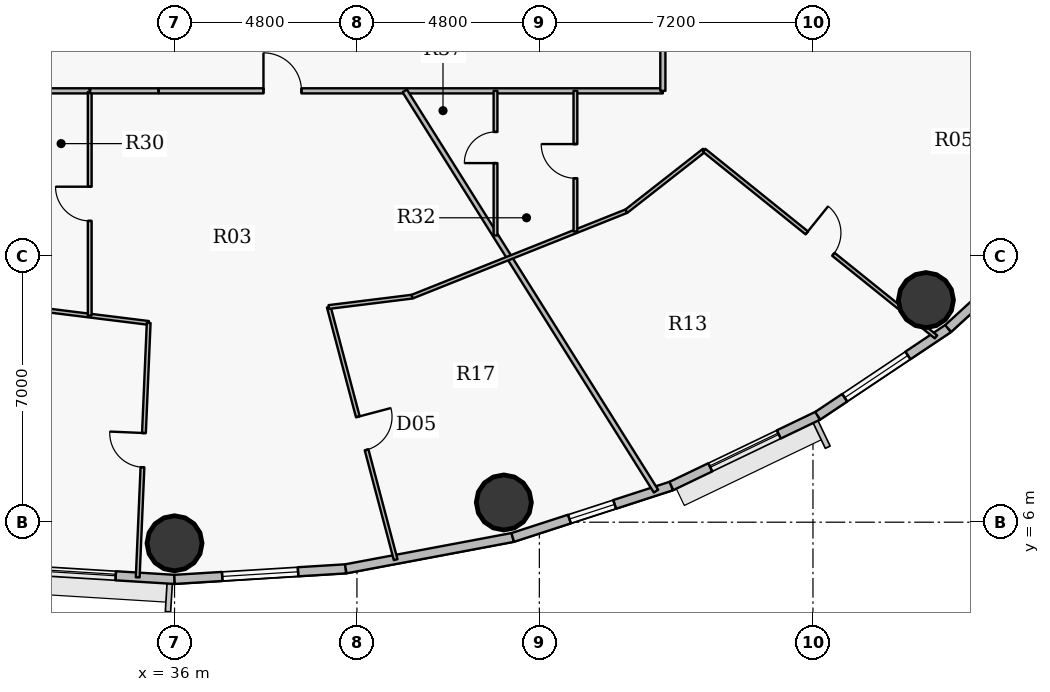
"""IFC4 building model, lengths in metres.
Left out: names, types, materials, properties, quantities, classifications, styles, units other than length and angle.
Written with IfcOpenShell. Run it as: python <this file> out.ifc"""

import sys

from ifc_helpers import new_model, si_unit, direction, frame, frame_2d, origin, origin_2d, place, context, subcontext, project, spatial, rectangle, hollow_circle, extrude, source, transform, mapped, element, fill, save


model = new_model("IFC4")
c1 = context("Model", 3, precision=1e-05, world=origin(), true_north=direction((0.0, 1.0)))
c2 = subcontext(c1, "Body", "Model", "MODEL_VIEW")
j1 = project(units=[si_unit("LENGTHUNIT", "METRE"), si_unit("PLANEANGLEUNIT", "RADIAN")], contexts=[c1])
p1 = place(None, origin())
s1 = spatial("IfcSite", under=j1, at=p1, CompositionType="ELEMENT")
p2 = place(p1, origin())
s2 = spatial("IfcBuilding", under=s1, at=p2, CompositionType="ELEMENT")
p3 = place(p2, frame((0.0, 0.0, 123.45)))
s3 = spatial("IfcBuildingStorey", under=s2, at=p3, CompositionType="ELEMENT", Elevation=123.45)
for number, where, z_axis, x_axis in (
    (1, (36.0, 5.445, 0.0), (0.0, 0.0, 1.0), (1.0, 0.0, 0.0)),
    (2, (44.666, 6.519, 0.0), (0.0, 0.0, 1.0), (1.0, 0.0, 0.0)),
    (3, (55.773, 11.844, 0.0), (0.0, 0.0, 1.0), (1.0, 0.0, 0.0)),
):
    element("IfcColumn", number, at=place(p3, frame(where, z_axis=z_axis, x_axis=x_axis)), inside=s3, PredefinedType="COLUMN", context=c2, shape_type="SweptSolid", body=[
        extrude(hollow_circle(Radius=0.725, WallThickness=0.042, at=origin_2d()), origin(), (0.0, 0.0, 1.0), 3.75),
    ])
p4 = place(p3, frame((36.0, 4.495, 0.0), z_axis=(0.0, 0.0, 1.0), x_axis=(-0.998107531589, 0.061492726276, 0.0)))
e4 = element("IfcWall", 4, at=p4, inside=s3, PredefinedType="SOLIDWALL", context=c2, shape_type="SweptSolid", body=[
    extrude(rectangle(XDim=4.514, YDim=0.24, at=frame_2d((2.257, 0.0))), origin(), (0.0, 0.0, 1.0), 3.5),
])
p5 = place(p4, frame((1.55, 0.0, 0.9)))
e5 = element("IfcOpeningElement", 5, at=p5, cuts=e4, PredefinedType="OPENING", context=c2, shape_type="SweptSolid", body=[
    extrude(rectangle(XDim=2.0, YDim=1.75, at=origin_2d()), frame((1.0, 0.13, 0.875), z_axis=(0.0, -1.0, 0.0), x_axis=(1.0, 0.0, 0.0)), (0.0, 0.0, 1.0), 0.26),
])
p6 = place(p3, frame((40.506, 4.773, 0.0), z_axis=(0.0, 0.0, 1.0), x_axis=(-0.998107531589, -0.061492726276, 0.0)))
e6 = element("IfcWall", 6, at=p6, inside=s3, PredefinedType="SOLIDWALL", context=c2, shape_type="SweptSolid", body=[
    extrude(rectangle(XDim=4.514, YDim=0.24, at=frame_2d((2.257, 0.0))), origin(), (0.0, 0.0, 1.0), 3.5),
])
p7 = place(p6, frame((1.257, 0.0, 0.9)))
e7 = element("IfcOpeningElement", 7, at=p7, cuts=e6, PredefinedType="OPENING", context=c2, shape_type="SweptSolid", body=[
    extrude(rectangle(XDim=2.0, YDim=1.75, at=origin_2d()), frame((1.0, 0.13, 0.875), z_axis=(0.0, -1.0, 0.0), x_axis=(1.0, 0.0, 0.0)), (0.0, 0.0, 1.0), 0.26),
])
p8 = place(p3, frame((44.9, 5.599, 0.0), z_axis=(0.0, 0.0, 1.0), x_axis=(-0.982789252177, -0.184730305596, 0.0)))
e8 = element("IfcWall", 8, at=p8, inside=s3, PredefinedType="SOLIDWALL", context=c2, shape_type="SweptSolid", body=[
    extrude(rectangle(XDim=4.471, YDim=0.24, at=frame_2d((2.235, 0.0))), origin(), (0.0, 0.0, 1.0), 3.5),
])
p9 = place(p3, frame((49.074, 6.953, 0.0), z_axis=(0.0, 0.0, 1.0), x_axis=(-0.951211346073, -0.308540070495, 0.0)))
e9 = element("IfcWall", 9, at=p9, inside=s3, PredefinedType="SOLIDWALL", context=c2, shape_type="SweptSolid", body=[
    extrude(rectangle(XDim=4.388, YDim=0.24, at=frame_2d((2.194, 0.0))), origin(), (0.0, 0.0, 1.0), 3.5),
])
p10 = place(p9, frame((1.569, 0.0, 0.9)))
e10 = element("IfcOpeningElement", 10, at=p10, cuts=e9, PredefinedType="OPENING", context=c2, shape_type="SweptSolid", body=[
    extrude(rectangle(XDim=1.25, YDim=1.65, at=origin_2d()), frame((0.625, 0.13, 0.825), z_axis=(0.0, -1.0, 0.0), x_axis=(1.0, 0.0, 0.0)), (0.0, 0.0, 1.0), 0.26),
])
p11 = place(p3, frame((52.925, 8.801, 0.0), z_axis=(0.0, 0.0, 1.0), x_axis=(-0.901589935876, -0.432591709962, 0.0)))
e11 = element("IfcWall", 11, at=p11, inside=s3, PredefinedType="SOLIDWALL", context=c2, shape_type="SweptSolid", body=[
    extrude(rectangle(XDim=4.272, YDim=0.24, at=frame_2d((2.136, 0.0))), origin(), (0.0, 0.0, 1.0), 3.5),
])
p12 = place(p11, frame((1.136, 0.0, 0.9)))
e12 = element("IfcOpeningElement", 12, at=p12, cuts=e11, PredefinedType="OPENING", context=c2, shape_type="SweptSolid", body=[
    extrude(rectangle(XDim=2.0, YDim=1.75, at=origin_2d()), frame((1.0, 0.13, 0.875), z_axis=(0.0, -1.0, 0.0), x_axis=(1.0, 0.0, 0.0)), (0.0, 0.0, 1.0), 0.26),
])
p13 = place(p3, frame((56.358, 11.097, 0.0), z_axis=(0.0, 0.0, 1.0), x_axis=(-0.831221811447, -0.555940914284, 0.0)))
e13 = element("IfcWall", 13, at=p13, inside=s3, PredefinedType="SOLIDWALL", context=c2, shape_type="SweptSolid", body=[
    extrude(rectangle(XDim=4.13, YDim=0.24, at=frame_2d((2.065, 0.0))), origin(), (0.0, 0.0, 1.0), 3.5),
])
p14 = place(p13, frame((1.276, 0.0, 0.9)))
e14 = element("IfcOpeningElement", 14, at=p14, cuts=e13, PredefinedType="OPENING", context=c2, shape_type="SweptSolid", body=[
    extrude(rectangle(XDim=2.0, YDim=1.75, at=origin_2d()), frame((1.0, 0.13, 0.875), z_axis=(0.0, -1.0, 0.0), x_axis=(1.0, 0.0, 0.0)), (0.0, 0.0, 1.0), 0.26),
])
p15 = place(p3, frame((59.289, 13.783, 0.0), z_axis=(0.0, 0.0, 1.0), x_axis=(-0.737113356241, -0.675769117414, 0.0)))
e15 = element("IfcWall", 15, at=p15, inside=s3, PredefinedType="SOLIDWALL", context=c2, shape_type="SweptSolid", body=[
    extrude(rectangle(XDim=3.976, YDim=0.24, at=frame_2d((1.988, 0.0))), origin(), (0.0, 0.0, 1.0), 3.5),
])
p16 = place(p15, frame((1.363, 0.0, 0.9)))
e16 = element("IfcOpeningElement", 16, at=p16, cuts=e15, PredefinedType="OPENING", context=c2, shape_type="SweptSolid", body=[
    extrude(rectangle(XDim=1.25, YDim=1.65, at=origin_2d()), frame((0.625, 0.13, 0.825), z_axis=(0.0, -1.0, 0.0), x_axis=(1.0, 0.0, 0.0)), (0.0, 0.0, 1.0), 0.26),
])
p17 = place(p3, frame((23.15, 17.35, 0.0), z_axis=(0.0, 0.0, 1.0), x_axis=(1.0, 0.0, 0.0)))
e17 = element("IfcWall", 17, at=p17, inside=s3, PredefinedType="PARTITIONING", context=c2, shape_type="SweptSolid", body=[
    extrude(rectangle(XDim=10.619, YDim=0.135, at=frame_2d((5.31, 0.0))), origin(), (0.0, 0.0, 1.0), 2.935),
])
p18 = place(p17, frame((4.211, 0.0, 0.0)))
e18 = element("IfcOpeningElement", 18, at=p18, cuts=e17, PredefinedType="OPENING", context=c2, shape_type="SweptSolid", body=[
    extrude(rectangle(XDim=1.0, YDim=2.15, at=origin_2d()), frame((0.5, 0.078, 1.075), z_axis=(0.0, -1.0, 0.0), x_axis=(1.0, 0.0, 0.0)), (0.0, 0.0, 1.0), 0.155),
])
p19 = place(p3, frame((30.551, 11.835, 0.0), z_axis=(0.0, 0.0, 1.0), x_axis=(0.992401646286, -0.123040531728, 0.0)))
e19 = element("IfcWall", 19, at=p19, inside=s3, PredefinedType="PARTITIONING", context=c2, shape_type="SweptSolid", body=[
    extrude(rectangle(XDim=4.806, YDim=0.1, at=frame_2d((2.403, 0.0))), origin(), (0.0, 0.0, 1.0), 3.5),
])
p20 = place(p3, frame((33.769, 11.436, 0.0), z_axis=(0.0, 0.0, 1.0), x_axis=(0.0, 1.0, 0.0)))
e20 = element("IfcWall", 20, at=p20, inside=s3, PredefinedType="PARTITIONING", context=c2, shape_type="SweptSolid", body=[
    extrude(rectangle(XDim=5.884, YDim=0.1, at=frame_2d((2.942, 0.0))), origin(), (0.0, 0.0, 1.0), 3.5),
])
p21 = place(p20, frame((2.492, 0.0, 0.0)))
e21 = element("IfcOpeningElement", 21, at=p21, cuts=e20, PredefinedType="OPENING", context=c2, shape_type="SweptSolid", body=[
    extrude(rectangle(XDim=0.9, YDim=2.1, at=origin_2d()), frame((0.45, 0.06, 1.05), z_axis=(0.0, -1.0, 0.0), x_axis=(1.0, 0.0, 0.0)), (0.0, 0.0, 1.0), 0.12),
])
p22 = place(p3, frame((35.031, 4.55, 0.0), z_axis=(0.0, 0.0, 1.0), x_axis=(0.043108301027, 0.999070405118, 0.0)))
e22 = element("IfcWall", 22, at=p22, inside=s3, PredefinedType="PARTITIONING", context=c2, shape_type="SweptSolid", body=[
    extrude(rectangle(XDim=6.7, YDim=0.1, at=frame_2d((3.35, 0.0))), origin(), (0.0, 0.0, 1.0), 2.935),
])
p23 = place(p22, frame((2.9, 0.0, 0.0)))
e23 = element("IfcOpeningElement", 23, at=p23, cuts=e22, PredefinedType="OPENING", context=c2, shape_type="SweptSolid", body=[
    extrude(rectangle(XDim=0.9, YDim=2.1, at=origin_2d()), frame((0.45, 0.06, 1.05), z_axis=(0.0, -1.0, 0.0), x_axis=(1.0, 0.0, 0.0)), (0.0, 0.0, 1.0), 0.12),
])
p24 = place(p3, frame((35.584, 17.35, 0.0), z_axis=(0.0, 0.0, 1.0), x_axis=(1.0, 0.0, 0.0)))
e24 = element("IfcWall", 24, at=p24, inside=s3, PredefinedType="PARTITIONING", context=c2, shape_type="SweptSolid", body=[
    extrude(rectangle(XDim=13.266, YDim=0.135, at=frame_2d((6.633, 0.0))), origin(), (0.0, 0.0, 1.0), 2.935),
])
p25 = place(p24, frame((2.757, 0.0, 0.0)))
e25 = element("IfcOpeningElement", 25, at=p25, cuts=e24, PredefinedType="OPENING", context=c2, shape_type="SweptSolid", body=[
    extrude(rectangle(XDim=1.0, YDim=2.15, at=origin_2d()), frame((0.5, 0.078, 1.075), z_axis=(0.0, -1.0, 0.0), x_axis=(1.0, 0.0, 0.0)), (0.0, 0.0, 1.0), 0.155),
])
p26 = place(p3, frame((40.059, 11.662, 0.0), z_axis=(0.0, 0.0, 1.0), x_axis=(0.255861334688, -0.966713492929, 0.0)))
e26 = element("IfcWall", 26, at=p26, inside=s3, PredefinedType="PARTITIONING", context=c2, shape_type="SweptSolid", body=[
    extrude(rectangle(XDim=6.877, YDim=0.1, at=frame_2d((3.438, 0.0))), origin(), (0.0, 0.0, 1.0), 2.935),
])
p27 = place(p26, frame((2.988, 0.0, 0.0)))
e27 = element("IfcOpeningElement", 27, at=p27, cuts=e26, PredefinedType="OPENING", context=c2, shape_type="SweptSolid", body=[
    extrude(rectangle(XDim=0.9, YDim=2.1, at=origin_2d()), frame((0.45, 0.06, 1.05), z_axis=(0.0, -1.0, 0.0), x_axis=(1.0, 0.0, 0.0)), (0.0, 0.0, 1.0), 0.12),
])
p28 = place(p3, frame((40.059, 11.662, 0.0), z_axis=(0.0, 0.0, 1.0), x_axis=(0.992393057675, 0.12310978466, 0.0)))
e28 = element("IfcWall", 28, at=p28, inside=s3, PredefinedType="PARTITIONING", context=c2, shape_type="SweptSolid", body=[
    extrude(rectangle(XDim=2.209, YDim=0.1, at=frame_2d((1.104, 0.0))), origin(), (0.0, 0.0, 1.0), 2.935),
])
p29 = place(p3, frame((42.058, 17.35, 0.0), z_axis=(0.0, 0.0, 1.0), x_axis=(0.531660079213, -0.846957826678, 0.0)))
e29 = element("IfcWall", 29, at=p29, inside=s3, PredefinedType="PARTITIONING", context=c2, shape_type="SweptSolid", body=[
    extrude(rectangle(XDim=12.437, YDim=0.135, at=frame_2d((6.219, 0.0))), origin(), (0.0, 0.0, 1.0), 2.935),
])
p30 = place(p3, frame((42.251, 11.934, 0.0), z_axis=(0.0, 0.0, 1.0), x_axis=(0.928803554156, 0.370572473055, 0.0)))
e30 = element("IfcWall", 30, at=p30, inside=s3, PredefinedType="PARTITIONING", context=c2, shape_type="SweptSolid", body=[
    extrude(rectangle(XDim=6.072, YDim=0.1, at=frame_2d((3.036, 0.0))), origin(), (0.0, 0.0, 1.0), 2.935),
])
p31 = place(p3, frame((44.447, 13.544, 0.0), z_axis=(0.0, 0.0, 1.0), x_axis=(0.0, 1.0, 0.0)))
e31 = element("IfcWall", 31, at=p31, inside=s3, PredefinedType="PARTITIONING", context=c2, shape_type="SweptSolid", body=[
    extrude(rectangle(XDim=3.806, YDim=0.1, at=frame_2d((1.903, 0.0))), origin(), (0.0, 0.0, 1.0), 3.5),
])
p32 = place(p31, frame((1.905, 0.0, 0.0)))
e32 = element("IfcOpeningElement", 32, at=p32, cuts=e31, PredefinedType="OPENING", context=c2, shape_type="SweptSolid", body=[
    extrude(rectangle(XDim=0.82, YDim=2.1, at=origin_2d()), frame((0.41, 0.06, 1.05), z_axis=(0.0, -1.0, 0.0), x_axis=(1.0, 0.0, 0.0)), (0.0, 0.0, 1.0), 0.12),
])
p33 = place(p3, frame((46.549, 13.649, 0.0), z_axis=(0.0, 0.0, 1.0), x_axis=(0.0, 1.0, 0.0)))
e33 = element("IfcWall", 33, at=p33, inside=s3, PredefinedType="PARTITIONING", context=c2, shape_type="SweptSolid", body=[
    extrude(rectangle(XDim=3.701, YDim=0.1, at=frame_2d((1.851, 0.0))), origin(), (0.0, 0.0, 1.0), 3.5),
])
p34 = place(p33, frame((1.4, 0.0, 0.0)))
e34 = element("IfcOpeningElement", 34, at=p34, cuts=e33, PredefinedType="OPENING", context=c2, shape_type="SweptSolid", body=[
    extrude(rectangle(XDim=0.9, YDim=2.1, at=origin_2d()), frame((0.45, 0.06, 1.05), z_axis=(0.0, -1.0, 0.0), x_axis=(1.0, 0.0, 0.0)), (0.0, 0.0, 1.0), 0.12),
])
p35 = place(p3, frame((47.891, 14.184, 0.0), z_axis=(0.0, 0.0, 1.0), x_axis=(0.787364158956, 0.616488184146, 0.0)))
e35 = element("IfcWall", 35, at=p35, inside=s3, PredefinedType="PARTITIONING", context=c2, shape_type="SweptSolid", body=[
    extrude(rectangle(XDim=2.597, YDim=0.1, at=frame_2d((1.299, 0.0))), origin(), (0.0, 0.0, 1.0), 3.5),
])
p36 = place(p3, frame((48.85, 17.35, 0.0), z_axis=(0.0, 0.0, 1.0), x_axis=(0.0, 1.0, 0.0)))
e36 = element("IfcWall", 36, at=p36, inside=s3, PredefinedType="PARTITIONING", context=c2, shape_type="SweptSolid", body=[
    extrude(rectangle(XDim=19.3, YDim=0.135, at=frame_2d((9.65, 0.0))), origin(), (0.0, 0.0, 1.0), 2.935),
])
p37 = place(p36, frame((2.036, 0.0, 0.0)))
e37 = element("IfcOpeningElement", 37, at=p37, cuts=e36, PredefinedType="OPENING", context=c2, shape_type="SweptSolid", body=[
    extrude(rectangle(XDim=1.0, YDim=2.15, at=origin_2d()), frame((0.5, 0.078, 1.075), z_axis=(0.0, -1.0, 0.0), x_axis=(1.0, 0.0, 0.0)), (0.0, 0.0, 1.0), 0.155),
])
p38 = place(p36, frame((10.875, 0.0, 0.0)))
e38 = element("IfcOpeningElement", 38, at=p38, cuts=e36, PredefinedType="OPENING", context=c2, shape_type="SweptSolid", body=[
    extrude(rectangle(XDim=1.0, YDim=2.15, at=origin_2d()), frame((0.5, 0.078, 1.075), z_axis=(0.0, -1.0, 0.0), x_axis=(1.0, 0.0, 0.0)), (0.0, 0.0, 1.0), 0.155),
])
p39 = place(p3, frame((48.85, 22.383, 0.0), z_axis=(0.0, 0.0, 1.0), x_axis=(0.941089213164, -0.338158384292, 0.0)))
e39 = element("IfcWall", 39, at=p39, inside=s3, PredefinedType="PARTITIONING", context=c2, shape_type="SweptSolid", body=[
    extrude(rectangle(XDim=14.069, YDim=0.135, at=frame_2d((7.035, 0.0))), origin(), (0.0, 0.0, 1.0), 2.935),
])
p40 = place(p3, frame((49.936, 15.786, 0.0), z_axis=(0.0, 0.0, 1.0), x_axis=(0.779083359145, -0.626920345421, 0.0)))
e40 = element("IfcWall", 40, at=p40, inside=s3, PredefinedType="PARTITIONING", context=c2, shape_type="SweptSolid", body=[
    extrude(rectangle(XDim=7.831, YDim=0.1, at=frame_2d((3.916, 0.0))), origin(), (0.0, 0.0, 1.0), 2.935),
])
p41 = place(p40, frame((3.466, 0.0, 0.0)))
e41 = element("IfcOpeningElement", 41, at=p41, cuts=e40, PredefinedType="OPENING", context=c2, shape_type="SweptSolid", body=[
    extrude(rectangle(XDim=0.9, YDim=2.1, at=origin_2d()), frame((0.45, 0.06, 1.05), z_axis=(0.0, -1.0, 0.0), x_axis=(1.0, 0.0, 0.0)), (0.0, 0.0, 1.0), 0.12),
])
p42 = place(p3, frame((35.574, 17.35, 0.0), z_axis=(0.0, 0.0, 1.0), x_axis=(-1.0, 0.0, 0.0)))
e42 = element("IfcWall", 42, at=p42, inside=s3, PredefinedType="PARTITIONING", context=c2, shape_type="SweptSolid", body=[
    extrude(rectangle(XDim=1.795, YDim=0.135, at=frame_2d((0.897, 0.0))), origin(), (0.0, 0.0, 1.0), 3.5),
])
m1 = source(origin(), c2, "Body", "SweptSolid", [
    extrude(rectangle(XDim=2.0, YDim=1.75, at=origin_2d()), frame((1.0, 0.03, 0.875), z_axis=(0.0, -1.0, 0.0), x_axis=(1.0, 0.0, 0.0)), (0.0, 0.0, 1.0), 0.06),
])
p43 = place(p5, origin())
e43 = element("IfcWindow", 43, at=p43, inside=s3, PartitioningType="DOUBLE_PANEL_VERTICAL", PredefinedType="WINDOW", context=c2, shape_type="MappedRepresentation", body=[
    mapped(m1, transform((0.0, 0.0, 0.0), x_axis=(1.0, 0.0, 0.0), y_axis=(0.0, 1.0, 0.0), z_axis=(0.0, 0.0, 1.0), scale=1.0)),
])
fill(e5, e43)
p44 = place(p7, origin())
e44 = element("IfcWindow", 44, at=p44, inside=s3, PartitioningType="DOUBLE_PANEL_VERTICAL", PredefinedType="WINDOW", context=c2, shape_type="MappedRepresentation", body=[
    mapped(m1, transform((0.0, 0.0, 0.0), x_axis=(1.0, 0.0, 0.0), y_axis=(0.0, 1.0, 0.0), z_axis=(0.0, 0.0, 1.0), scale=1.0)),
])
fill(e7, e44)
p45 = place(p12, origin())
e45 = element("IfcWindow", 45, at=p45, inside=s3, PartitioningType="DOUBLE_PANEL_VERTICAL", PredefinedType="WINDOW", context=c2, shape_type="MappedRepresentation", body=[
    mapped(m1, transform((0.0, 0.0, 0.0), x_axis=(1.0, 0.0, 0.0), y_axis=(0.0, 1.0, 0.0), z_axis=(0.0, 0.0, 1.0), scale=1.0)),
])
fill(e12, e45)
p46 = place(p14, origin())
e46 = element("IfcWindow", 46, at=p46, inside=s3, PartitioningType="DOUBLE_PANEL_VERTICAL", PredefinedType="WINDOW", context=c2, shape_type="MappedRepresentation", body=[
    mapped(m1, transform((0.0, 0.0, 0.0), x_axis=(1.0, 0.0, 0.0), y_axis=(0.0, 1.0, 0.0), z_axis=(0.0, 0.0, 1.0), scale=1.0)),
])
fill(e14, e46)
m2 = source(origin(), c2, "Body", "SweptSolid", [
    extrude(rectangle(XDim=1.25, YDim=1.65, at=origin_2d()), frame((0.625, 0.03, 0.825), z_axis=(0.0, -1.0, 0.0), x_axis=(1.0, 0.0, 0.0)), (0.0, 0.0, 1.0), 0.06),
])
p47 = place(p10, origin())
e47 = element("IfcWindow", 47, at=p47, inside=s3, PartitioningType="SINGLE_PANEL", PredefinedType="WINDOW", context=c2, shape_type="MappedRepresentation", body=[
    mapped(m2, transform((0.0, 0.0, 0.0), x_axis=(1.0, 0.0, 0.0), y_axis=(0.0, 1.0, 0.0), z_axis=(0.0, 0.0, 1.0), scale=1.0)),
])
fill(e10, e47)
m3 = source(origin(), c2, "Body", "SweptSolid", [
    extrude(rectangle(XDim=1.0, YDim=2.15, at=origin_2d()), frame((0.5, 0.025, 1.075), z_axis=(0.0, -1.0, 0.0), x_axis=(1.0, 0.0, 0.0)), (0.0, 0.0, 1.0), 0.05),
])
p48 = place(p25, origin())
e48 = element("IfcDoor", 48, at=p48, inside=s3, OperationType="SINGLE_SWING_LEFT", PredefinedType="DOOR", context=c2, shape_type="MappedRepresentation", body=[
    mapped(m3, transform((0.0, 0.0, 0.0), x_axis=(1.0, 0.0, 0.0), y_axis=(0.0, 1.0, 0.0), z_axis=(0.0, 0.0, 1.0), scale=1.0)),
])
fill(e25, e48)
m4 = source(origin(), c2, "Body", "SweptSolid", [
    extrude(rectangle(XDim=0.9, YDim=2.1, at=origin_2d()), frame((0.45, 0.025, 1.05), z_axis=(0.0, -1.0, 0.0), x_axis=(1.0, 0.0, 0.0)), (0.0, 0.0, 1.0), 0.05),
])
p49 = place(p23, origin())
e49 = element("IfcDoor", 49, at=p49, inside=s3, OperationType="SINGLE_SWING_RIGHT", PredefinedType="DOOR", context=c2, shape_type="MappedRepresentation", body=[
    mapped(m4, transform((0.0, 0.0, 0.0), x_axis=(1.0, 0.0, 0.0), y_axis=(0.0, 1.0, 0.0), z_axis=(0.0, 0.0, 1.0), scale=1.0)),
])
fill(e23, e49)
p50 = place(p27, origin())
e50 = element("IfcDoor", 50, at=p50, inside=s3, OperationType="SINGLE_SWING_LEFT", PredefinedType="DOOR", context=c2, shape_type="MappedRepresentation", body=[
    mapped(m4, transform((0.0, 0.0, 0.0), x_axis=(1.0, 0.0, 0.0), y_axis=(0.0, 1.0, 0.0), z_axis=(0.0, 0.0, 1.0), scale=1.0)),
])
fill(e27, e50)
p51 = place(p21, origin())
e51 = element("IfcDoor", 51, at=p51, inside=s3, OperationType="SINGLE_SWING_RIGHT", PredefinedType="DOOR", context=c2, shape_type="MappedRepresentation", body=[
    mapped(m4, transform((0.0, 0.0, 0.0), x_axis=(1.0, 0.0, 0.0), y_axis=(0.0, 1.0, 0.0), z_axis=(0.0, 0.0, 1.0), scale=1.0)),
])
fill(e21, e51)
p52 = place(p41, origin())
e52 = element("IfcDoor", 52, at=p52, inside=s3, OperationType="SINGLE_SWING_LEFT", PredefinedType="DOOR", context=c2, shape_type="MappedRepresentation", body=[
    mapped(m4, transform((0.0, 0.0, 0.0), x_axis=(1.0, 0.0, 0.0), y_axis=(0.0, 1.0, 0.0), z_axis=(0.0, 0.0, 1.0), scale=1.0)),
])
fill(e41, e52)
p53 = place(p34, origin())
e53 = element("IfcDoor", 53, at=p53, inside=s3, OperationType="SINGLE_SWING_RIGHT", PredefinedType="DOOR", context=c2, shape_type="MappedRepresentation", body=[
    mapped(m4, transform((0.0, 0.0, 0.0), x_axis=(1.0, 0.0, 0.0), y_axis=(0.0, 1.0, 0.0), z_axis=(0.0, 0.0, 1.0), scale=1.0)),
])
fill(e34, e53)
m5 = source(origin(), c2, "Body", "SweptSolid", [
    extrude(rectangle(XDim=0.82, YDim=2.1, at=origin_2d()), frame((0.41, 0.025, 1.05), z_axis=(0.0, -1.0, 0.0), x_axis=(1.0, 0.0, 0.0)), (0.0, 0.0, 1.0), 0.05),
])
p54 = place(p32, origin())
e54 = element("IfcDoor", 54, at=p54, inside=s3, OperationType="SINGLE_SWING_LEFT", PredefinedType="DOOR", context=c2, shape_type="MappedRepresentation", body=[
    mapped(m5, transform((0.0, 0.0, 0.0), x_axis=(1.0, 0.0, 0.0), y_axis=(0.0, 1.0, 0.0), z_axis=(0.0, 0.0, 1.0), scale=1.0)),
])
fill(e32, e54)
save(model, sys.argv[1])
